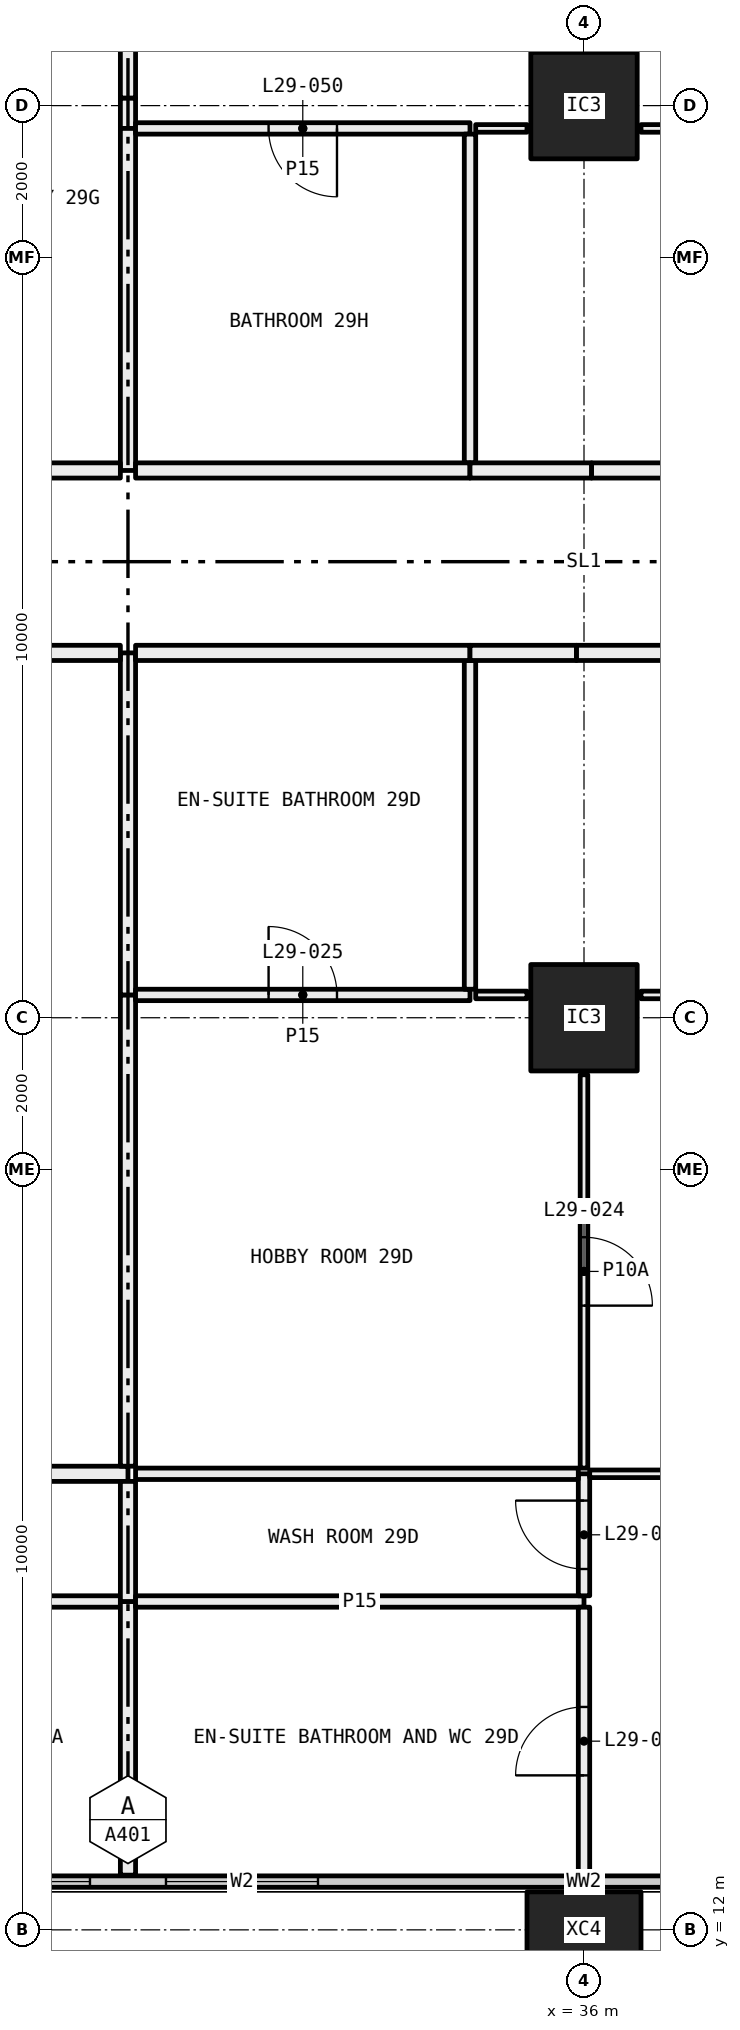
"""IFC4 building model, lengths in metres.
Left out: names, types, materials, properties, quantities, classifications, styles, units other than length and angle.
Written with IfcOpenShell. Run it as: python <this file> out.ifc"""

import sys

from ifc_helpers import new_model, si_unit, direction, frame, frame_2d, origin, origin_2d, place, context, subcontext, project, spatial, rectangle, hollow_rectangle, extrude, element, fill, save


model = new_model("IFC4")
c1 = context("Model", 3, precision=1e-05, world=origin(), true_north=direction((0.0, 1.0)))
c2 = subcontext(c1, "Body", "Model", "MODEL_VIEW")
j1 = project(units=[si_unit("LENGTHUNIT", "METRE"), si_unit("PLANEANGLEUNIT", "RADIAN")], contexts=[c1])
p1 = place(None, origin())
s1 = spatial("IfcSite", under=j1, at=p1, CompositionType="ELEMENT")
p2 = place(p1, origin())
s2 = spatial("IfcBuilding", under=s1, at=p2, CompositionType="ELEMENT")
p3 = place(p2, frame((0.0, 0.0, 113.85)))
s3 = spatial("IfcBuildingStorey", under=s2, at=p3, CompositionType="ELEMENT", Elevation=113.85)
p4 = place(p3, frame((36.0, 12.0, -0.4), z_axis=(0.0, 0.0, 1.0), x_axis=(1.0, 0.0, 0.0)))
e1 = element("IfcColumn", 1, at=p4, inside=s3, PredefinedType="COLUMN", context=c2, shape_type="SweptSolid", body=[
    extrude(hollow_rectangle(XDim=1.5, YDim=1.0, WallThickness=0.06, at=origin_2d()), origin(), (0.0, 0.0, 1.0), 3.45),
])
for number, where, z_axis, x_axis in (
    (2, (36.0, 24.0, 0.0), (0.0, 0.0, 1.0), (1.0, 0.0, 0.0)),
    (3, (36.0, 36.0, 0.0), (0.0, 0.0, 1.0), (1.0, 0.0, 0.0)),
):
    element("IfcColumn", number, at=place(p3, frame(where, z_axis=z_axis, x_axis=x_axis)), inside=s3, PredefinedType="COLUMN", context=c2, shape_type="SweptSolid", body=[
        extrude(hollow_rectangle(XDim=1.4, YDim=1.4, WallThickness=0.06, at=origin_2d()), origin(), (0.0, 0.0, 1.0), 3.05),
    ])
p5 = place(p3, frame((6.56, 12.635, 0.0), z_axis=(0.0, 0.0, 1.0), x_axis=(1.0, 0.0, 0.0)))
e4 = element("IfcWall", 4, at=p5, inside=s3, PredefinedType="ELEMENTEDWALL", context=c2, shape_type="SweptSolid", body=[
    extrude(rectangle(XDim=58.88, YDim=0.15, at=frame_2d((29.44, 0.0))), origin(), (0.0, 0.0, 1.0), 3.05),
])
p6 = place(p5, frame((0.44, 0.0, 0.45)))
e5 = element("IfcOpeningElement", 5, at=p6, cuts=e4, PredefinedType="OPENING", context=c2, shape_type="SweptSolid", body=[
    extrude(rectangle(XDim=4.5, YDim=2.55, at=frame_2d((2.25, 1.275))), frame((0.0, 0.085, 0.0), z_axis=(0.0, -1.0, 0.0), x_axis=(1.0, 0.0, 0.0)), (0.0, 0.0, 1.0), 0.17),
])
p7 = place(p5, frame((8.19, 0.0, 0.45)))
e6 = element("IfcOpeningElement", 6, at=p7, cuts=e4, PredefinedType="OPENING", context=c2, shape_type="SweptSolid", body=[
    extrude(rectangle(XDim=2.75, YDim=2.55, at=frame_2d((1.375, 1.275))), frame((0.0, 0.085, 0.0), z_axis=(0.0, -1.0, 0.0), x_axis=(1.0, 0.0, 0.0)), (0.0, 0.0, 1.0), 0.17),
])
p8 = place(p5, frame((11.94, 0.0, 0.45)))
e7 = element("IfcOpeningElement", 7, at=p8, cuts=e4, PredefinedType="OPENING", context=c2, shape_type="SweptSolid", body=[
    extrude(rectangle(XDim=2.75, YDim=2.55, at=frame_2d((1.375, 1.275))), frame((0.0, 0.085, 0.0), z_axis=(0.0, -1.0, 0.0), x_axis=(1.0, 0.0, 0.0)), (0.0, 0.0, 1.0), 0.17),
])
p9 = place(p5, frame((20.19, 0.0, 0.45)))
e8 = element("IfcOpeningElement", 8, at=p9, cuts=e4, PredefinedType="OPENING", context=c2, shape_type="SweptSolid", body=[
    extrude(rectangle(XDim=2.75, YDim=2.55, at=frame_2d((1.375, 1.275))), frame((0.0, 0.085, 0.0), z_axis=(0.0, -1.0, 0.0), x_axis=(1.0, 0.0, 0.0)), (0.0, 0.0, 1.0), 0.17),
])
p10 = place(p5, frame((23.94, 0.0, 0.45)))
e9 = element("IfcOpeningElement", 9, at=p10, cuts=e4, PredefinedType="OPENING", context=c2, shape_type="SweptSolid", body=[
    extrude(rectangle(XDim=2.0, YDim=2.55, at=frame_2d((1.0, 1.275))), frame((0.0, 0.085, 0.0), z_axis=(0.0, -1.0, 0.0), x_axis=(1.0, 0.0, 0.0)), (0.0, 0.0, 1.0), 0.17),
])
p11 = place(p5, frame((32.19, 0.0, 0.45)))
e10 = element("IfcOpeningElement", 10, at=p11, cuts=e4, PredefinedType="OPENING", context=c2, shape_type="SweptSolid", body=[
    extrude(rectangle(XDim=2.75, YDim=2.55, at=frame_2d((1.375, 1.275))), frame((0.0, 0.085, 0.0), z_axis=(0.0, -1.0, 0.0), x_axis=(1.0, 0.0, 0.0)), (0.0, 0.0, 1.0), 0.17),
])
p12 = place(p5, frame((35.94, 0.0, 0.45)))
e11 = element("IfcOpeningElement", 11, at=p12, cuts=e4, PredefinedType="OPENING", context=c2, shape_type="SweptSolid", body=[
    extrude(rectangle(XDim=2.75, YDim=2.55, at=frame_2d((1.375, 1.275))), frame((0.0, 0.085, 0.0), z_axis=(0.0, -1.0, 0.0), x_axis=(1.0, 0.0, 0.0)), (0.0, 0.0, 1.0), 0.17),
])
p13 = place(p5, frame((44.19, 0.0, 0.45)))
e12 = element("IfcOpeningElement", 12, at=p13, cuts=e4, PredefinedType="OPENING", context=c2, shape_type="SweptSolid", body=[
    extrude(rectangle(XDim=2.75, YDim=2.55, at=frame_2d((1.375, 1.275))), frame((0.0, 0.085, 0.0), z_axis=(0.0, -1.0, 0.0), x_axis=(1.0, 0.0, 0.0)), (0.0, 0.0, 1.0), 0.17),
])
p14 = place(p5, frame((47.94, 0.0, 0.45)))
e13 = element("IfcOpeningElement", 13, at=p14, cuts=e4, PredefinedType="OPENING", context=c2, shape_type="SweptSolid", body=[
    extrude(rectangle(XDim=2.0, YDim=2.55, at=frame_2d((1.0, 1.275))), frame((0.0, 0.085, 0.0), z_axis=(0.0, -1.0, 0.0), x_axis=(1.0, 0.0, 0.0)), (0.0, 0.0, 1.0), 0.17),
])
p15 = place(p5, frame((53.94, 0.0, 0.45)))
e14 = element("IfcOpeningElement", 14, at=p15, cuts=e4, PredefinedType="OPENING", context=c2, shape_type="SweptSolid", body=[
    extrude(rectangle(XDim=4.5, YDim=2.55, at=frame_2d((2.25, 1.275))), frame((0.0, 0.085, 0.0), z_axis=(0.0, -1.0, 0.0), x_axis=(1.0, 0.0, 0.0)), (0.0, 0.0, 1.0), 0.17),
])
p16 = place(p3, frame((29.9, 16.32, 0.0), z_axis=(0.0, 0.0, 1.0), x_axis=(-1.0, 0.0, 0.0)))
e15 = element("IfcWall", 15, at=p16, inside=s3, PredefinedType="PARTITIONING", context=c2, shape_type="SweptSolid", body=[
    extrude(rectangle(XDim=5.825, YDim=0.15, at=frame_2d((2.913, 0.0))), origin(), (0.0, 0.0, 1.0), 3.05),
])
p17 = place(p3, frame((30.0, 12.72, 0.0), z_axis=(0.0, 0.0, 1.0), x_axis=(0.0, 1.0, 0.0)))
e16 = element("IfcWall", 16, at=p17, inside=s3, PredefinedType="PARTITIONING", context=c2, shape_type="SweptSolid", body=[
    extrude(rectangle(XDim=3.6, YDim=0.2, at=frame_2d((1.8, 0.0))), origin(), (0.0, 0.0, 1.0), 3.05),
])
p18 = place(p3, frame((30.0, 18.0, 0.0), z_axis=(0.0, 0.0, 1.0), x_axis=(-1.0, 0.0, 0.0)))
e17 = element("IfcWall", 17, at=p18, inside=s3, PredefinedType="PARTITIONING", context=c2, shape_type="SweptSolid", body=[
    extrude(rectangle(XDim=4.1, YDim=0.2, at=frame_2d((2.05, 0.0))), origin(), (0.0, 0.0, 1.0), 3.05),
])
p19 = place(p3, frame((30.0, 16.32, 0.0), z_axis=(0.0, 0.0, 1.0), x_axis=(0.0, 1.0, 0.0)))
e18 = element("IfcWall", 18, at=p19, inside=s3, PredefinedType="PARTITIONING", context=c2, shape_type="SweptSolid", body=[
    extrude(rectangle(XDim=1.58, YDim=0.2, at=frame_2d((0.79, 0.0))), origin(), (0.0, 0.0, 1.0), 3.05),
])
p20 = place(p3, frame((30.0, 18.1, 0.0), z_axis=(0.0, 0.0, 1.0), x_axis=(0.0, 1.0, 0.0)))
e19 = element("IfcWall", 19, at=p20, inside=s3, PredefinedType="PARTITIONING", context=c2, shape_type="SweptSolid", body=[
    extrude(rectangle(XDim=6.2, YDim=0.2, at=frame_2d((3.1, 0.0))), origin(), (0.0, 0.0, 1.0), 2.45),
])
p21 = place(p3, frame((30.0, 24.3, 0.0), z_axis=(0.0, 0.0, 1.0), x_axis=(0.0, 1.0, 0.0)))
e20 = element("IfcWall", 20, at=p21, inside=s3, PredefinedType="PARTITIONING", context=c2, shape_type="SweptSolid", body=[
    extrude(rectangle(XDim=4.5, YDim=0.2, at=frame_2d((2.25, 0.0))), origin(), (0.0, 0.0, 1.0), 3.05),
])
p22 = place(p3, frame((29.9, 28.8, 0.0), z_axis=(0.0, 0.0, 1.0), x_axis=(-1.0, 0.0, 0.0)))
e21 = element("IfcWall", 21, at=p22, inside=s3, PredefinedType="PARTITIONING", context=c2, shape_type="SweptSolid", body=[
    extrude(rectangle(XDim=4.0, YDim=0.2, at=frame_2d((2.0, 0.0))), origin(), (0.0, 0.0, 1.0), 3.05),
])
p23 = place(p3, frame((36.0, 16.32, 0.0), z_axis=(0.0, 0.0, 1.0), x_axis=(-1.0, 0.0, 0.0)))
e22 = element("IfcWall", 22, at=p23, inside=s3, PredefinedType="PARTITIONING", context=c2, shape_type="SweptSolid", body=[
    extrude(rectangle(XDim=5.9, YDim=0.15, at=frame_2d((2.95, 0.0))), origin(), (0.0, 0.0, 1.0), 2.45),
])
p24 = place(p3, frame((36.0, 12.72, 0.0), z_axis=(0.0, 0.0, 1.0), x_axis=(0.0, 1.0, 0.0)))
e23 = element("IfcWall", 23, at=p24, inside=s3, PredefinedType="PARTITIONING", context=c2, shape_type="SweptSolid", body=[
    extrude(rectangle(XDim=3.525, YDim=0.15, at=frame_2d((1.763, 0.0))), origin(), (0.0, 0.0, 1.0), 2.45),
])
p25 = place(p24, frame((1.312, 0.0, 0.0)))
e24 = element("IfcOpeningElement", 24, at=p25, cuts=e23, PredefinedType="OPENING", context=c2, shape_type="SweptSolid", body=[
    extrude(rectangle(XDim=0.9, YDim=2.1, at=frame_2d((0.45, 1.05))), frame((0.0, 0.085, 0.0), z_axis=(0.0, -1.0, 0.0), x_axis=(1.0, 0.0, 0.0)), (0.0, 0.0, 1.0), 0.17),
])
p26 = place(p3, frame((36.0, 16.395, 0.0), z_axis=(0.0, 0.0, 1.0), x_axis=(0.0, 1.0, 0.0)))
e25 = element("IfcWall", 25, at=p26, inside=s3, PredefinedType="PARTITIONING", context=c2, shape_type="SweptSolid", body=[
    extrude(rectangle(XDim=1.605, YDim=0.15, at=frame_2d((0.802, 0.0))), origin(), (0.0, 0.0, 1.0), 2.45),
])
p27 = place(p26, frame((0.353, 0.0, 0.0)))
e26 = element("IfcOpeningElement", 26, at=p27, cuts=e25, PredefinedType="OPENING", context=c2, shape_type="SweptSolid", body=[
    extrude(rectangle(XDim=0.9, YDim=2.1, at=frame_2d((0.45, 1.05))), frame((0.0, 0.085, 0.0), z_axis=(0.0, -1.0, 0.0), x_axis=(1.0, 0.0, 0.0)), (0.0, 0.0, 1.0), 0.17),
])
p28 = place(p3, frame((35.925, 18.0, 0.0), z_axis=(0.0, 0.0, 1.0), x_axis=(-1.0, 0.0, 0.0)))
e27 = element("IfcWall", 27, at=p28, inside=s3, PredefinedType="PARTITIONING", context=c2, shape_type="SweptSolid", body=[
    extrude(rectangle(XDim=5.825, YDim=0.15, at=frame_2d((2.913, 0.0))), origin(), (0.0, 0.0, 1.0), 2.45),
])
p29 = place(p3, frame((40.5, 18.0, 0.0), z_axis=(0.0, 0.0, 1.0), x_axis=(-1.0, 0.0, 0.0)))
e28 = element("IfcWall", 28, at=p29, inside=s3, PredefinedType="PARTITIONING", context=c2, shape_type="SweptSolid", body=[
    extrude(rectangle(XDim=4.425, YDim=0.1, at=frame_2d((2.212, 0.0))), origin(), (0.0, 0.0, 1.0), 2.45),
])
p30 = place(p29, frame((1.762, 0.0, 0.0)))
e29 = element("IfcOpeningElement", 29, at=p30, cuts=e28, PredefinedType="OPENING", context=c2, shape_type="SweptSolid", body=[
    extrude(rectangle(XDim=0.9, YDim=2.1, at=frame_2d((0.45, 1.05))), frame((0.0, 0.06, 0.0), z_axis=(0.0, -1.0, 0.0), x_axis=(1.0, 0.0, 0.0)), (0.0, 0.0, 1.0), 0.12),
])
p31 = place(p3, frame((36.0, 18.075, 0.0), z_axis=(0.0, 0.0, 1.0), x_axis=(0.0, 1.0, 0.0)))
e30 = element("IfcWall", 30, at=p31, inside=s3, PredefinedType="PARTITIONING", context=c2, shape_type="SweptSolid", body=[
    extrude(rectangle(XDim=5.175, YDim=0.1, at=frame_2d((2.587, 0.0))), origin(), (0.0, 0.0, 1.0), 2.45),
])
p32 = place(p31, frame((2.137, 0.0, 0.0)))
e31 = element("IfcOpeningElement", 31, at=p32, cuts=e30, PredefinedType="OPENING", context=c2, shape_type="SweptSolid", body=[
    extrude(rectangle(XDim=0.9, YDim=2.1, at=frame_2d((0.45, 1.05))), frame((0.0, 0.06, 0.0), z_axis=(0.0, -1.0, 0.0), x_axis=(1.0, 0.0, 0.0)), (0.0, 0.0, 1.0), 0.12),
])
p33 = place(p3, frame((34.5, 24.3, 0.0), z_axis=(0.0, 0.0, 1.0), x_axis=(-1.0, 0.0, 0.0)))
e32 = element("IfcWall", 32, at=p33, inside=s3, PredefinedType="PARTITIONING", context=c2, shape_type="SweptSolid", body=[
    extrude(rectangle(XDim=4.4, YDim=0.15, at=frame_2d((2.2, 0.0))), origin(), (0.0, 0.0, 1.0), 3.05),
])
p34 = place(p33, frame((1.75, 0.0, 0.0)))
e33 = element("IfcOpeningElement", 33, at=p34, cuts=e32, PredefinedType="OPENING", context=c2, shape_type="SweptSolid", body=[
    extrude(rectangle(XDim=0.9, YDim=2.1, at=frame_2d((0.45, 1.05))), frame((0.0, 0.085, 0.0), z_axis=(0.0, -1.0, 0.0), x_axis=(1.0, 0.0, 0.0)), (0.0, 0.0, 1.0), 0.17),
])
p35 = place(p3, frame((35.25, 24.3, 0.0), z_axis=(0.0, 0.0, 1.0), x_axis=(-1.0, 0.0, 0.0)))
e34 = element("IfcWall", 34, at=p35, inside=s3, PredefinedType="PARTITIONING", context=c2, shape_type="SweptSolid", body=[
    extrude(rectangle(XDim=0.675, YDim=0.1, at=frame_2d((0.337, 0.0))), origin(), (0.0, 0.0, 1.0), 3.05),
])
p36 = place(p3, frame((40.45, 24.3, 0.0), z_axis=(0.0, 0.0, 1.0), x_axis=(-1.0, 0.0, 0.0)))
e35 = element("IfcWall", 35, at=p36, inside=s3, PredefinedType="PARTITIONING", context=c2, shape_type="SweptSolid", body=[
    extrude(rectangle(XDim=3.7, YDim=0.1, at=frame_2d((1.85, 0.0))), origin(), (0.0, 0.0, 1.0), 3.05),
])
p37 = place(p3, frame((34.5, 24.375, 0.0), z_axis=(0.0, 0.0, 1.0), x_axis=(0.0, 1.0, 0.0)))
e36 = element("IfcWall", 36, at=p37, inside=s3, PredefinedType="PARTITIONING", context=c2, shape_type="SweptSolid", body=[
    extrude(rectangle(XDim=4.325, YDim=0.15, at=frame_2d((2.163, 0.0))), origin(), (0.0, 0.0, 1.0), 3.05),
])
p38 = place(p3, frame((34.5, 28.8, 0.0), z_axis=(0.0, 0.0, 1.0), x_axis=(-1.0, 0.0, 0.0)))
e37 = element("IfcWall", 37, at=p38, inside=s3, PredefinedType="PARTITIONING", context=c2, shape_type="SweptSolid", body=[
    extrude(rectangle(XDim=4.4, YDim=0.2, at=frame_2d((2.2, 0.0))), origin(), (0.0, 0.0, 1.0), 3.05),
])
p39 = place(p3, frame((46.0, 28.8, 0.0), z_axis=(0.0, 0.0, 1.0), x_axis=(-1.0, 0.0, 0.0)))
e38 = element("IfcWall", 38, at=p39, inside=s3, PredefinedType="PARTITIONING", context=c2, shape_type="SweptSolid", body=[
    extrude(rectangle(XDim=10.1, YDim=0.2, at=frame_2d((5.05, 0.0))), origin(), (0.0, 0.0, 1.0), 2.45),
])
p40 = place(p3, frame((35.9, 28.8, 0.0), z_axis=(0.0, 0.0, 1.0), x_axis=(-1.0, 0.0, 0.0)))
e39 = element("IfcWall", 39, at=p40, inside=s3, PredefinedType="PARTITIONING", context=c2, shape_type="SweptSolid", body=[
    extrude(rectangle(XDim=1.4, YDim=0.2, at=frame_2d((0.7, 0.0))), origin(), (0.0, 0.0, 1.0), 3.05),
])
p41 = place(p3, frame((30.0, 35.7, 0.0), z_axis=(0.0, 0.0, 1.0), x_axis=(0.0, 1.0, 0.0)))
e40 = element("IfcWall", 40, at=p41, inside=s3, PredefinedType="PARTITIONING", context=c2, shape_type="SweptSolid", body=[
    extrude(rectangle(XDim=0.4, YDim=0.2, at=frame_2d((0.2, 0.0))), origin(), (0.0, 0.0, 1.0), 2.45),
])
p42 = place(p3, frame((30.0, 36.1, 0.0), z_axis=(0.0, 0.0, 1.0), x_axis=(0.0, 1.0, 0.0)))
e41 = element("IfcWall", 41, at=p42, inside=s3, PredefinedType="PARTITIONING", context=c2, shape_type="SweptSolid", body=[
    extrude(rectangle(XDim=5.8, YDim=0.2, at=frame_2d((2.9, 0.0))), origin(), (0.0, 0.0, 1.0), 3.05),
])
p43 = place(p3, frame((30.0, 31.2, 0.0), z_axis=(0.0, 0.0, 1.0), x_axis=(0.0, 1.0, 0.0)))
e42 = element("IfcWall", 42, at=p43, inside=s3, PredefinedType="PARTITIONING", context=c2, shape_type="SweptSolid", body=[
    extrude(rectangle(XDim=4.5, YDim=0.2, at=frame_2d((2.25, 0.0))), origin(), (0.0, 0.0, 1.0), 3.05),
])
p44 = place(p3, frame((26.0, 31.2, 0.0), z_axis=(0.0, 0.0, 1.0), x_axis=(1.0, 0.0, 0.0)))
e43 = element("IfcWall", 43, at=p44, inside=s3, PredefinedType="PARTITIONING", context=c2, shape_type="SweptSolid", body=[
    extrude(rectangle(XDim=3.9, YDim=0.2, at=frame_2d((1.95, 0.0))), origin(), (0.0, 0.0, 1.0), 3.05),
])
p45 = place(p3, frame((30.1, 35.7, 0.0), z_axis=(0.0, 0.0, 1.0), x_axis=(1.0, 0.0, 0.0)))
e44 = element("IfcWall", 44, at=p45, inside=s3, PredefinedType="PARTITIONING", context=c2, shape_type="SweptSolid", body=[
    extrude(rectangle(XDim=4.4, YDim=0.15, at=frame_2d((2.2, 0.0))), origin(), (0.0, 0.0, 1.0), 3.05),
])
p46 = place(p45, frame((1.75, 0.0, 0.0)))
e45 = element("IfcOpeningElement", 45, at=p46, cuts=e44, PredefinedType="OPENING", context=c2, shape_type="SweptSolid", body=[
    extrude(rectangle(XDim=0.9, YDim=2.1, at=frame_2d((0.45, 1.05))), frame((0.0, 0.085, 0.0), z_axis=(0.0, -1.0, 0.0), x_axis=(1.0, 0.0, 0.0)), (0.0, 0.0, 1.0), 0.17),
])
p47 = place(p3, frame((34.575, 35.7, 0.0), z_axis=(0.0, 0.0, 1.0), x_axis=(1.0, 0.0, 0.0)))
e46 = element("IfcWall", 46, at=p47, inside=s3, PredefinedType="PARTITIONING", context=c2, shape_type="SweptSolid", body=[
    extrude(rectangle(XDim=0.675, YDim=0.1, at=frame_2d((0.337, 0.0))), origin(), (0.0, 0.0, 1.0), 3.05),
])
p48 = place(p3, frame((36.75, 35.7, 0.0), z_axis=(0.0, 0.0, 1.0), x_axis=(1.0, 0.0, 0.0)))
e47 = element("IfcWall", 47, at=p48, inside=s3, PredefinedType="PARTITIONING", context=c2, shape_type="SweptSolid", body=[
    extrude(rectangle(XDim=3.7, YDim=0.1, at=frame_2d((1.85, 0.0))), origin(), (0.0, 0.0, 1.0), 3.05),
])
p49 = place(p3, frame((34.5, 31.3, 0.0), z_axis=(0.0, 0.0, 1.0), x_axis=(0.0, 1.0, 0.0)))
e48 = element("IfcWall", 48, at=p49, inside=s3, PredefinedType="PARTITIONING", context=c2, shape_type="SweptSolid", body=[
    extrude(rectangle(XDim=4.325, YDim=0.15, at=frame_2d((2.163, 0.0))), origin(), (0.0, 0.0, 1.0), 3.05),
])
p50 = place(p3, frame((30.1, 31.2, 0.0), z_axis=(0.0, 0.0, 1.0), x_axis=(1.0, 0.0, 0.0)))
e49 = element("IfcWall", 49, at=p50, inside=s3, PredefinedType="PARTITIONING", context=c2, shape_type="SweptSolid", body=[
    extrude(rectangle(XDim=4.4, YDim=0.2, at=frame_2d((2.2, 0.0))), origin(), (0.0, 0.0, 1.0), 3.05),
])
p51 = place(p3, frame((34.5, 31.2, 0.0), z_axis=(0.0, 0.0, 1.0), x_axis=(1.0, 0.0, 0.0)))
e50 = element("IfcWall", 50, at=p51, inside=s3, PredefinedType="PARTITIONING", context=c2, shape_type="SweptSolid", body=[
    extrude(rectangle(XDim=1.6, YDim=0.2, at=frame_2d((0.8, 0.0))), origin(), (0.0, 0.0, 1.0), 2.45),
])
p52 = place(p3, frame((36.1, 31.2, 0.0), z_axis=(0.0, 0.0, 1.0), x_axis=(1.0, 0.0, 0.0)))
e51 = element("IfcWall", 51, at=p52, inside=s3, PredefinedType="PARTITIONING", context=c2, shape_type="SweptSolid", body=[
    extrude(rectangle(XDim=10.0, YDim=0.2, at=frame_2d((5.0, 0.0))), origin(), (0.0, 0.0, 1.0), 3.05),
])
p53 = place(p9, origin())
e52 = element("IfcWindow", 52, at=p53, inside=s3, PartitioningType="SINGLE_PANEL", PredefinedType="WINDOW", context=c2, shape_type="SweptSolid", body=[
    extrude(rectangle(XDim=2.75, YDim=2.55, at=frame_2d((1.375, 1.275))), frame((0.0, 0.03, 0.0), z_axis=(0.0, -1.0, 0.0), x_axis=(1.0, 0.0, 0.0)), (0.0, 0.0, 1.0), 0.06),
])
fill(e8, e52)
p54 = place(p10, origin())
e53 = element("IfcWindow", 53, at=p54, inside=s3, PartitioningType="SINGLE_PANEL", PredefinedType="WINDOW", context=c2, shape_type="SweptSolid", body=[
    extrude(rectangle(XDim=2.0, YDim=2.55, at=frame_2d((1.0, 1.275))), frame((0.0, 0.03, 0.0), z_axis=(0.0, -1.0, 0.0), x_axis=(1.0, 0.0, 0.0)), (0.0, 0.0, 1.0), 0.06),
])
fill(e9, e53)
p55 = place(p25, origin())
e54 = element("IfcDoor", 54, at=p55, inside=s3, OperationType="SINGLE_SWING_RIGHT", PredefinedType="DOOR", context=c2, shape_type="SweptSolid", body=[
    extrude(rectangle(XDim=0.9, YDim=2.1, at=frame_2d((0.45, 1.05))), frame((0.0, 0.025, 0.0), z_axis=(0.0, -1.0, 0.0), x_axis=(1.0, 0.0, 0.0)), (0.0, 0.0, 1.0), 0.05),
])
fill(e24, e54)
p56 = place(p27, origin())
e55 = element("IfcDoor", 55, at=p56, inside=s3, OperationType="SINGLE_SWING_LEFT", PredefinedType="DOOR", context=c2, shape_type="SweptSolid", body=[
    extrude(rectangle(XDim=0.9, YDim=2.1, at=frame_2d((0.45, 1.05))), frame((0.0, 0.025, 0.0), z_axis=(0.0, -1.0, 0.0), x_axis=(1.0, 0.0, 0.0)), (0.0, 0.0, 1.0), 0.05),
])
fill(e26, e55)
p57 = place(p32, frame((0.9, 0.0, 0.0), x_axis=(-1.0, 0.0, 0.0)))
e56 = element("IfcDoor", 56, at=p57, inside=s3, OperationType="SINGLE_SWING_LEFT", PredefinedType="DOOR", context=c2, shape_type="SweptSolid", body=[
    extrude(rectangle(XDim=0.9, YDim=2.1, at=frame_2d((0.45, 1.05))), frame((0.0, 0.025, 0.0), z_axis=(0.0, -1.0, 0.0), x_axis=(1.0, 0.0, 0.0)), (0.0, 0.0, 1.0), 0.05),
])
fill(e31, e56)
p58 = place(p34, frame((0.9, 0.0, 0.0), x_axis=(-1.0, 0.0, 0.0)))
e57 = element("IfcDoor", 57, at=p58, inside=s3, OperationType="SINGLE_SWING_RIGHT", PredefinedType="DOOR", context=c2, shape_type="SweptSolid", body=[
    extrude(rectangle(XDim=0.9, YDim=2.1, at=frame_2d((0.45, 1.05))), frame((0.0, 0.025, 0.0), z_axis=(0.0, -1.0, 0.0), x_axis=(1.0, 0.0, 0.0)), (0.0, 0.0, 1.0), 0.05),
])
fill(e33, e57)
p59 = place(p46, frame((0.9, 0.0, 0.0), x_axis=(-1.0, 0.0, 0.0)))
e58 = element("IfcDoor", 58, at=p59, inside=s3, OperationType="SINGLE_SWING_RIGHT", PredefinedType="DOOR", context=c2, shape_type="SweptSolid", body=[
    extrude(rectangle(XDim=0.9, YDim=2.1, at=frame_2d((0.45, 1.05))), frame((0.0, 0.025, 0.0), z_axis=(0.0, -1.0, 0.0), x_axis=(1.0, 0.0, 0.0)), (0.0, 0.0, 1.0), 0.05),
])
fill(e45, e58)
save(model, sys.argv[1])
